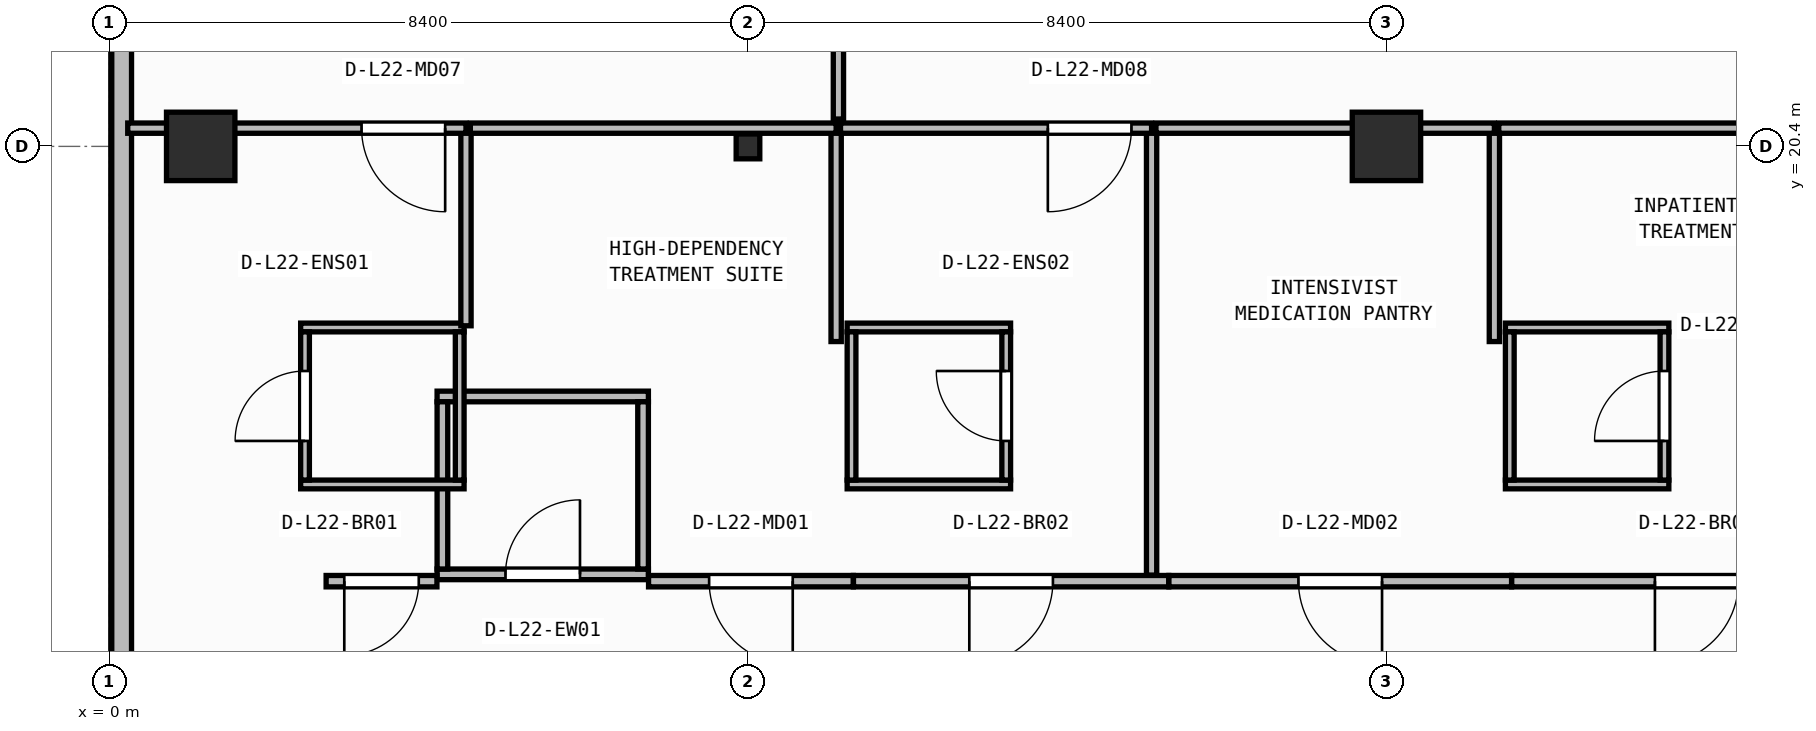
"""IFC4 building model, lengths in metres.
Left out: names, types, materials, properties, quantities, classifications, styles, units other than length and angle.
Written with IfcOpenShell. Run it as: python <this file> out.ifc"""

import sys

from ifc_helpers import new_model, si_unit, direction, frame, frame_2d, origin, origin_2d, place, context, subcontext, project, spatial, rectangle, i_section, extrude, element, fill, save


model = new_model("IFC4")
c1 = context("Model", 3, precision=1e-05, world=origin(), true_north=direction((0.0, 1.0)))
c2 = subcontext(c1, "Body", "Model", "MODEL_VIEW")
j1 = project(units=[si_unit("LENGTHUNIT", "METRE"), si_unit("PLANEANGLEUNIT", "RADIAN")], contexts=[c1])
p1 = place(None, origin())
s1 = spatial("IfcSite", under=j1, at=p1, CompositionType="ELEMENT")
p2 = place(p1, origin())
s2 = spatial("IfcBuilding", under=s1, at=p2, CompositionType="ELEMENT")
p3 = place(p2, frame((0.0, 0.0, 89.65)))
s3 = spatial("IfcBuildingStorey", under=s2, at=p3, CompositionType="ELEMENT", Elevation=89.65)
p4 = place(p3, frame((1.2, 20.4, 0.0), z_axis=(0.0, 0.0, 1.0), x_axis=(1.0, 0.0, 0.0)))
e1 = element("IfcColumn", 1, at=p4, inside=s3, PredefinedType="COLUMN", context=c2, shape_type="SweptSolid", body=[
    extrude(rectangle(XDim=0.9, YDim=0.9, at=origin_2d()), origin(), (0.0, 0.0, 1.0), 3.95),
])
p5 = place(p3, frame((8.4, 20.4, 0.0), z_axis=(0.0, 0.0, 1.0), x_axis=(1.0, 0.0, 0.0)))
e2 = element("IfcColumn", 2, at=p5, inside=s3, PredefinedType="COLUMN", context=c2, shape_type="SweptSolid", body=[
    extrude(i_section(OverallWidth=0.311, OverallDepth=0.327, WebThickness=0.016, FlangeThickness=0.025, FilletRadius=0.017, at=origin_2d()), origin(), (0.0, 0.0, 1.0), 3.95),
])
p6 = place(p3, frame((16.8, 20.4, 0.0), z_axis=(0.0, 0.0, 1.0), x_axis=(1.0, 0.0, 0.0)))
e3 = element("IfcColumn", 3, at=p6, inside=s3, PredefinedType="COLUMN", context=c2, shape_type="SweptSolid", body=[
    extrude(rectangle(XDim=0.9, YDim=0.9, at=origin_2d()), origin(), (0.0, 0.0, 1.0), 3.95),
])
p7 = place(p3, frame((0.16, 41.04, 0.0), z_axis=(0.0, 0.0, 1.0), x_axis=(0.0, -1.0, 0.0)))
e4 = element("IfcWall", 4, at=p7, inside=s3, PredefinedType="STANDARD", context=c2, shape_type="SweptSolid", body=[
    extrude(rectangle(XDim=38.28, YDim=0.26, at=frame_2d((19.14, 0.0))), origin(), (0.0, 0.0, 1.0), 3.71),
])
p8 = place(p7, frame((28.15, 0.0, 0.9)))
e5 = element("IfcOpeningElement", 5, at=p8, cuts=e4, PredefinedType="OPENING", context=c2, shape_type="SweptSolid", body=[
    extrude(rectangle(XDim=2.4, YDim=1.65, at=frame_2d((1.2, 0.825))), frame((0.0, 0.14, 0.0), z_axis=(0.0, -1.0, 0.0), x_axis=(1.0, 0.0, 0.0)), (0.0, 0.0, 1.0), 0.28),
])
p9 = place(p3, frame((4.31, 14.77, 0.0), z_axis=(0.0, 0.0, 1.0), x_axis=(1.0, 0.0, 0.0)))
e6 = element("IfcWall", 6, at=p9, inside=s3, PredefinedType="PARTITIONING", context=c2, shape_type="SweptSolid", body=[
    extrude(rectangle(XDim=2.78, YDim=0.14, at=frame_2d((1.39, 0.0))), origin(), (0.0, 0.0, 1.0), 3.71),
])
p10 = place(p9, frame((0.9, 0.0, 0.0)))
e7 = element("IfcOpeningElement", 7, at=p10, cuts=e6, PredefinedType="OPENING", context=c2, shape_type="SweptSolid", body=[
    extrude(rectangle(XDim=0.98, YDim=2.1, at=frame_2d((0.49, 1.05))), frame((0.0, 0.08, 0.0), z_axis=(0.0, -1.0, 0.0), x_axis=(1.0, 0.0, 0.0)), (0.0, 0.0, 1.0), 0.16),
])
p11 = place(p3, frame((4.31, 17.11, 0.0), z_axis=(0.0, 0.0, 1.0), x_axis=(1.0, 0.0, 0.0)))
e8 = element("IfcWall", 8, at=p11, inside=s3, PredefinedType="PARTITIONING", context=c2, shape_type="SweptSolid", body=[
    extrude(rectangle(XDim=2.78, YDim=0.14, at=frame_2d((1.39, 0.0))), origin(), (0.0, 0.0, 1.0), 3.71),
])
for number, where, z_axis, x_axis in (
    (9, (4.38, 14.84, 0.0), (0.0, 0.0, 1.0), (0.0, 1.0, 0.0)),
    (10, (7.02, 14.84, 0.0), (0.0, 0.0, 1.0), (0.0, 1.0, 0.0)),
):
    element("IfcWall", number, at=place(p3, frame(where, z_axis=z_axis, x_axis=x_axis)), inside=s3, PredefinedType="PARTITIONING", context=c2, shape_type="SweptSolid", body=[
        extrude(rectangle(XDim=2.2, YDim=0.14, at=frame_2d((1.1, 0.0))), origin(), (0.0, 0.0, 1.0), 3.71),
    ])
for number, where, z_axis, x_axis in (
    (11, (2.515, 15.952, 0.0), (0.0, 0.0, 1.0), (1.0, 0.0, 0.0)),
    (12, (2.515, 18.018, 0.0), (0.0, 0.0, 1.0), (1.0, 0.0, 0.0)),
):
    element("IfcWall", number, at=place(p3, frame(where, z_axis=z_axis, x_axis=x_axis)), inside=s3, PredefinedType="PARTITIONING", context=c2, shape_type="SweptSolid", body=[
        extrude(rectangle(XDim=2.15, YDim=0.115, at=frame_2d((1.075, 0.0))), origin(), (0.0, 0.0, 1.0), 3.71),
    ])
p12 = place(p3, frame((2.573, 16.01, 0.0), z_axis=(0.0, 0.0, 1.0), x_axis=(0.0, 1.0, 0.0)))
e13 = element("IfcWall", 13, at=p12, inside=s3, PredefinedType="PARTITIONING", context=c2, shape_type="SweptSolid", body=[
    extrude(rectangle(XDim=1.95, YDim=0.115, at=frame_2d((0.975, 0.0))), origin(), (0.0, 0.0, 1.0), 3.71),
])
p13 = place(p12, frame((0.515, 0.0, 0.0)))
e14 = element("IfcOpeningElement", 14, at=p13, cuts=e13, PredefinedType="OPENING", context=c2, shape_type="SweptSolid", body=[
    extrude(rectangle(XDim=0.92, YDim=2.1, at=frame_2d((0.46, 1.05))), frame((0.0, 0.067, 0.0), z_axis=(0.0, -1.0, 0.0), x_axis=(1.0, 0.0, 0.0)), (0.0, 0.0, 1.0), 0.135),
])
p14 = place(p3, frame((4.607, 16.01, 0.0), z_axis=(0.0, 0.0, 1.0), x_axis=(0.0, 1.0, 0.0)))
e15 = element("IfcWall", 15, at=p14, inside=s3, PredefinedType="PARTITIONING", context=c2, shape_type="SweptSolid", body=[
    extrude(rectangle(XDim=1.95, YDim=0.115, at=frame_2d((0.975, 0.0))), origin(), (0.0, 0.0, 1.0), 3.71),
])
for number, where, z_axis, x_axis in (
    (16, (9.705, 15.952, 0.0), (0.0, 0.0, 1.0), (1.0, 0.0, 0.0)),
    (17, (9.705, 18.018, 0.0), (0.0, 0.0, 1.0), (1.0, 0.0, 0.0)),
):
    element("IfcWall", number, at=place(p3, frame(where, z_axis=z_axis, x_axis=x_axis)), inside=s3, PredefinedType="PARTITIONING", context=c2, shape_type="SweptSolid", body=[
        extrude(rectangle(XDim=2.15, YDim=0.115, at=frame_2d((1.075, 0.0))), origin(), (0.0, 0.0, 1.0), 3.71),
    ])
p15 = place(p3, frame((9.762, 16.01, 0.0), z_axis=(0.0, 0.0, 1.0), x_axis=(0.0, 1.0, 0.0)))
e18 = element("IfcWall", 18, at=p15, inside=s3, PredefinedType="PARTITIONING", context=c2, shape_type="SweptSolid", body=[
    extrude(rectangle(XDim=1.95, YDim=0.115, at=frame_2d((0.975, 0.0))), origin(), (0.0, 0.0, 1.0), 3.71),
])
p16 = place(p3, frame((11.798, 16.01, 0.0), z_axis=(0.0, 0.0, 1.0), x_axis=(0.0, 1.0, 0.0)))
e19 = element("IfcWall", 19, at=p16, inside=s3, PredefinedType="PARTITIONING", context=c2, shape_type="SweptSolid", body=[
    extrude(rectangle(XDim=1.95, YDim=0.115, at=frame_2d((0.975, 0.0))), origin(), (0.0, 0.0, 1.0), 3.71),
])
p17 = place(p16, frame((0.515, 0.0, 0.0)))
e20 = element("IfcOpeningElement", 20, at=p17, cuts=e19, PredefinedType="OPENING", context=c2, shape_type="SweptSolid", body=[
    extrude(rectangle(XDim=0.92, YDim=2.1, at=frame_2d((0.46, 1.05))), frame((0.0, 0.067, 0.0), z_axis=(0.0, -1.0, 0.0), x_axis=(1.0, 0.0, 0.0)), (0.0, 0.0, 1.0), 0.135),
])
for number, where, z_axis, x_axis in (
    (21, (18.365, 15.952, 0.0), (0.0, 0.0, 1.0), (1.0, 0.0, 0.0)),
    (22, (18.365, 18.018, 0.0), (0.0, 0.0, 1.0), (1.0, 0.0, 0.0)),
):
    element("IfcWall", number, at=place(p3, frame(where, z_axis=z_axis, x_axis=x_axis)), inside=s3, PredefinedType="PARTITIONING", context=c2, shape_type="SweptSolid", body=[
        extrude(rectangle(XDim=2.15, YDim=0.115, at=frame_2d((1.075, 0.0))), origin(), (0.0, 0.0, 1.0), 3.71),
    ])
p18 = place(p3, frame((18.423, 16.01, 0.0), z_axis=(0.0, 0.0, 1.0), x_axis=(0.0, 1.0, 0.0)))
e23 = element("IfcWall", 23, at=p18, inside=s3, PredefinedType="PARTITIONING", context=c2, shape_type="SweptSolid", body=[
    extrude(rectangle(XDim=1.95, YDim=0.115, at=frame_2d((0.975, 0.0))), origin(), (0.0, 0.0, 1.0), 3.71),
])
p19 = place(p3, frame((20.458, 16.01, 0.0), z_axis=(0.0, 0.0, 1.0), x_axis=(0.0, 1.0, 0.0)))
e24 = element("IfcWall", 24, at=p19, inside=s3, PredefinedType="PARTITIONING", context=c2, shape_type="SweptSolid", body=[
    extrude(rectangle(XDim=1.95, YDim=0.115, at=frame_2d((0.975, 0.0))), origin(), (0.0, 0.0, 1.0), 3.71),
])
p20 = place(p19, frame((0.515, 0.0, 0.0)))
e25 = element("IfcOpeningElement", 25, at=p20, cuts=e24, PredefinedType="OPENING", context=c2, shape_type="SweptSolid", body=[
    extrude(rectangle(XDim=0.92, YDim=2.1, at=frame_2d((0.46, 1.05))), frame((0.0, 0.067, 0.0), z_axis=(0.0, -1.0, 0.0), x_axis=(1.0, 0.0, 0.0)), (0.0, 0.0, 1.0), 0.135),
])
p21 = place(p3, frame((4.308, 14.68, 0.0), z_axis=(0.0, 0.0, 1.0), x_axis=(-1.0, 0.0, 0.0)))
e26 = element("IfcWall", 26, at=p21, inside=s3, PredefinedType="PARTITIONING", context=c2, shape_type="SweptSolid", body=[
    extrude(rectangle(XDim=1.458, YDim=0.15, at=frame_2d((0.729, 0.0))), origin(), (0.0, 0.0, 1.0), 3.71),
])
p22 = place(p21, frame((0.239, 0.0, 0.0)))
e27 = element("IfcOpeningElement", 27, at=p22, cuts=e26, PredefinedType="OPENING", context=c2, shape_type="SweptSolid", body=[
    extrude(rectangle(XDim=0.98, YDim=2.1, at=frame_2d((0.49, 1.05))), frame((0.0, 0.085, 0.0), z_axis=(0.0, -1.0, 0.0), x_axis=(1.0, 0.0, 0.0)), (0.0, 0.0, 1.0), 0.17),
])
p23 = place(p3, frame((9.786, 14.68, 0.0), z_axis=(0.0, 0.0, 1.0), x_axis=(-1.0, 0.0, 0.0)))
e28 = element("IfcWall", 28, at=p23, inside=s3, PredefinedType="PARTITIONING", context=c2, shape_type="SweptSolid", body=[
    extrude(rectangle(XDim=2.694, YDim=0.15, at=frame_2d((1.347, 0.0))), origin(), (0.0, 0.0, 1.0), 3.71),
])
p24 = place(p23, frame((0.797, 0.0, 0.0)))
e29 = element("IfcOpeningElement", 29, at=p24, cuts=e28, PredefinedType="OPENING", context=c2, shape_type="SweptSolid", body=[
    extrude(rectangle(XDim=1.1, YDim=2.1, at=frame_2d((0.55, 1.05))), frame((0.0, 0.085, 0.0), z_axis=(0.0, -1.0, 0.0), x_axis=(1.0, 0.0, 0.0)), (0.0, 0.0, 1.0), 0.17),
])
p25 = place(p3, frame((13.936, 14.68, 0.0), z_axis=(0.0, 0.0, 1.0), x_axis=(-1.0, 0.0, 0.0)))
e30 = element("IfcWall", 30, at=p25, inside=s3, PredefinedType="PARTITIONING", context=c2, shape_type="SweptSolid", body=[
    extrude(rectangle(XDim=4.148, YDim=0.15, at=frame_2d((2.074, 0.0))), origin(), (0.0, 0.0, 1.0), 3.71),
])
p26 = place(p25, frame((1.524, 0.0, 0.0)))
e31 = element("IfcOpeningElement", 31, at=p26, cuts=e30, PredefinedType="OPENING", context=c2, shape_type="SweptSolid", body=[
    extrude(rectangle(XDim=1.1, YDim=2.1, at=frame_2d((0.55, 1.05))), frame((0.0, 0.085, 0.0), z_axis=(0.0, -1.0, 0.0), x_axis=(1.0, 0.0, 0.0)), (0.0, 0.0, 1.0), 0.17),
])
p27 = place(p3, frame((18.446, 14.68, 0.0), z_axis=(0.0, 0.0, 1.0), x_axis=(-1.0, 0.0, 0.0)))
e32 = element("IfcWall", 32, at=p27, inside=s3, PredefinedType="PARTITIONING", context=c2, shape_type="SweptSolid", body=[
    extrude(rectangle(XDim=4.508, YDim=0.15, at=frame_2d((2.254, 0.0))), origin(), (0.0, 0.0, 1.0), 3.71),
])
p28 = place(p27, frame((1.704, 0.0, 0.0)))
e33 = element("IfcOpeningElement", 33, at=p28, cuts=e32, PredefinedType="OPENING", context=c2, shape_type="SweptSolid", body=[
    extrude(rectangle(XDim=1.1, YDim=2.1, at=frame_2d((0.55, 1.05))), frame((0.0, 0.085, 0.0), z_axis=(0.0, -1.0, 0.0), x_axis=(1.0, 0.0, 0.0)), (0.0, 0.0, 1.0), 0.17),
])
p29 = place(p3, frame((23.316, 14.68, 0.0), z_axis=(0.0, 0.0, 1.0), x_axis=(-1.0, 0.0, 0.0)))
e34 = element("IfcWall", 34, at=p29, inside=s3, PredefinedType="PARTITIONING", context=c2, shape_type="SweptSolid", body=[
    extrude(rectangle(XDim=4.868, YDim=0.15, at=frame_2d((2.434, 0.0))), origin(), (0.0, 0.0, 1.0), 3.71),
])
p30 = place(p29, frame((1.884, 0.0, 0.0)))
e35 = element("IfcOpeningElement", 35, at=p30, cuts=e34, PredefinedType="OPENING", context=c2, shape_type="SweptSolid", body=[
    extrude(rectangle(XDim=1.1, YDim=2.1, at=frame_2d((0.55, 1.05))), frame((0.0, 0.085, 0.0), z_axis=(0.0, -1.0, 0.0), x_axis=(1.0, 0.0, 0.0)), (0.0, 0.0, 1.0), 0.17),
])
p31 = place(p3, frame((4.69, 18.04, 0.0), z_axis=(0.0, 0.0, 1.0), x_axis=(0.0, 1.0, 0.0)))
e36 = element("IfcWall", 36, at=p31, inside=s3, PredefinedType="PARTITIONING", context=c2, shape_type="SweptSolid", body=[
    extrude(rectangle(XDim=2.6, YDim=0.135, at=frame_2d((1.3, 0.0))), origin(), (0.0, 0.0, 1.0), 3.71),
])
p32 = place(p3, frame((4.69, 20.64, 0.0), z_axis=(0.0, 0.0, 1.0), x_axis=(-1.0, 0.0, 0.0)))
e37 = element("IfcWall", 37, at=p32, inside=s3, PredefinedType="PARTITIONING", context=c2, shape_type="SweptSolid", body=[
    extrude(rectangle(XDim=4.45, YDim=0.135, at=frame_2d((2.225, 0.0))), origin(), (0.0, 0.0, 1.0), 3.073),
])
p33 = place(p32, frame((0.274, 0.0, 0.0)))
e38 = element("IfcOpeningElement", 38, at=p33, cuts=e37, PredefinedType="OPENING", context=c2, shape_type="SweptSolid", body=[
    extrude(rectangle(XDim=1.1, YDim=2.1, at=frame_2d((0.55, 1.05))), frame((0.0, 0.077, 0.0), z_axis=(0.0, -1.0, 0.0), x_axis=(1.0, 0.0, 0.0)), (0.0, 0.0, 1.0), 0.155),
])
p34 = place(p3, frame((9.56, 17.833, 0.0), z_axis=(0.0, 0.0, 1.0), x_axis=(0.0, 1.0, 0.0)))
e39 = element("IfcWall", 39, at=p34, inside=s3, PredefinedType="PARTITIONING", context=c2, shape_type="SweptSolid", body=[
    extrude(rectangle(XDim=2.807, YDim=0.135, at=frame_2d((1.404, 0.0))), origin(), (0.0, 0.0, 1.0), 3.71),
])
p35 = place(p3, frame((9.56, 20.64, 0.0), z_axis=(0.0, 0.0, 1.0), x_axis=(-1.0, 0.0, 0.0)))
e40 = element("IfcWall", 40, at=p35, inside=s3, PredefinedType="PARTITIONING", context=c2, shape_type="SweptSolid", body=[
    extrude(rectangle(XDim=4.812, YDim=0.135, at=frame_2d((2.406, 0.0))), origin(), (0.0, 0.0, 1.0), 3.073),
])
p36 = place(p3, frame((13.71, 14.76, 0.0), z_axis=(0.0, 0.0, 1.0), x_axis=(0.0, 1.0, 0.0)))
e41 = element("IfcWall", 41, at=p36, inside=s3, PredefinedType="PARTITIONING", context=c2, shape_type="SweptSolid", body=[
    extrude(rectangle(XDim=5.88, YDim=0.135, at=frame_2d((2.94, 0.0))), origin(), (0.0, 0.0, 1.0), 3.71),
])
p37 = place(p3, frame((13.71, 20.64, 0.0), z_axis=(0.0, 0.0, 1.0), x_axis=(-1.0, 0.0, 0.0)))
e42 = element("IfcWall", 42, at=p37, inside=s3, PredefinedType="PARTITIONING", context=c2, shape_type="SweptSolid", body=[
    extrude(rectangle(XDim=4.093, YDim=0.135, at=frame_2d((2.046, 0.0))), origin(), (0.0, 0.0, 1.0), 3.073),
])
p38 = place(p37, frame((0.265, 0.0, 0.0)))
e43 = element("IfcOpeningElement", 43, at=p38, cuts=e42, PredefinedType="OPENING", context=c2, shape_type="SweptSolid", body=[
    extrude(rectangle(XDim=1.1, YDim=2.1, at=frame_2d((0.55, 1.05))), frame((0.0, 0.077, 0.0), z_axis=(0.0, -1.0, 0.0), x_axis=(1.0, 0.0, 0.0)), (0.0, 0.0, 1.0), 0.155),
])
p39 = place(p3, frame((18.22, 17.833, 0.0), z_axis=(0.0, 0.0, 1.0), x_axis=(0.0, 1.0, 0.0)))
e44 = element("IfcWall", 44, at=p39, inside=s3, PredefinedType="PARTITIONING", context=c2, shape_type="SweptSolid", body=[
    extrude(rectangle(XDim=2.807, YDim=0.135, at=frame_2d((1.404, 0.0))), origin(), (0.0, 0.0, 1.0), 3.71),
])
p40 = place(p3, frame((18.22, 20.64, 0.0), z_axis=(0.0, 0.0, 1.0), x_axis=(-1.0, 0.0, 0.0)))
e45 = element("IfcWall", 45, at=p40, inside=s3, PredefinedType="PARTITIONING", context=c2, shape_type="SweptSolid", body=[
    extrude(rectangle(XDim=4.452, YDim=0.135, at=frame_2d((2.226, 0.0))), origin(), (0.0, 0.0, 1.0), 3.073),
])
p41 = place(p3, frame((23.032, 20.64, 0.0), z_axis=(0.0, 0.0, 1.0), x_axis=(-1.0, 0.0, 0.0)))
e46 = element("IfcWall", 46, at=p41, inside=s3, PredefinedType="PARTITIONING", context=c2, shape_type="SweptSolid", body=[
    extrude(rectangle(XDim=4.755, YDim=0.135, at=frame_2d((2.377, 0.0))), origin(), (0.0, 0.0, 1.0), 3.073),
])
p42 = place(p3, frame((9.59, 20.76, 0.0), z_axis=(0.0, 0.0, 1.0), x_axis=(0.0, 1.0, 0.0)))
e47 = element("IfcWall", 47, at=p42, inside=s3, PredefinedType="PARTITIONING", context=c2, shape_type="SweptSolid", body=[
    extrude(rectangle(XDim=6.38, YDim=0.135, at=frame_2d((3.19, 0.0))), origin(), (0.0, 0.0, 1.0), 3.71),
])
p43 = place(p10, origin())
e48 = element("IfcDoor", 48, at=p43, inside=s3, OperationType="SINGLE_SWING_RIGHT", PredefinedType="DOOR", context=c2, shape_type="SweptSolid", body=[
    extrude(rectangle(XDim=0.98, YDim=2.1, at=frame_2d((0.49, 1.05))), frame((0.0, 0.025, 0.0), z_axis=(0.0, -1.0, 0.0), x_axis=(1.0, 0.0, 0.0)), (0.0, 0.0, 1.0), 0.05),
])
fill(e7, e48)
p44 = place(p13, origin())
e49 = element("IfcDoor", 49, at=p44, inside=s3, OperationType="SINGLE_SWING_LEFT", PredefinedType="DOOR", context=c2, shape_type="SweptSolid", body=[
    extrude(rectangle(XDim=0.92, YDim=2.1, at=frame_2d((0.46, 1.05))), frame((0.0, 0.025, 0.0), z_axis=(0.0, -1.0, 0.0), x_axis=(1.0, 0.0, 0.0)), (0.0, 0.0, 1.0), 0.05),
])
fill(e14, e49)
p45 = place(p17, origin())
e50 = element("IfcDoor", 50, at=p45, inside=s3, OperationType="SINGLE_SWING_RIGHT", PredefinedType="DOOR", context=c2, shape_type="SweptSolid", body=[
    extrude(rectangle(XDim=0.92, YDim=2.1, at=frame_2d((0.46, 1.05))), frame((0.0, 0.025, 0.0), z_axis=(0.0, -1.0, 0.0), x_axis=(1.0, 0.0, 0.0)), (0.0, 0.0, 1.0), 0.05),
])
fill(e20, e50)
p46 = place(p20, origin())
e51 = element("IfcDoor", 51, at=p46, inside=s3, OperationType="SINGLE_SWING_LEFT", PredefinedType="DOOR", context=c2, shape_type="SweptSolid", body=[
    extrude(rectangle(XDim=0.92, YDim=2.1, at=frame_2d((0.46, 1.05))), frame((0.0, 0.025, 0.0), z_axis=(0.0, -1.0, 0.0), x_axis=(1.0, 0.0, 0.0)), (0.0, 0.0, 1.0), 0.05),
])
fill(e25, e51)
p47 = place(p22, origin())
e52 = element("IfcDoor", 52, at=p47, inside=s3, OperationType="SINGLE_SWING_RIGHT", PredefinedType="DOOR", context=c2, shape_type="SweptSolid", body=[
    extrude(rectangle(XDim=0.98, YDim=2.1, at=frame_2d((0.49, 1.05))), frame((0.0, 0.025, 0.0), z_axis=(0.0, -1.0, 0.0), x_axis=(1.0, 0.0, 0.0)), (0.0, 0.0, 1.0), 0.05),
])
fill(e27, e52)
p48 = place(p24, origin())
e53 = element("IfcDoor", 53, at=p48, inside=s3, OperationType="SINGLE_SWING_LEFT", PredefinedType="DOOR", context=c2, shape_type="SweptSolid", body=[
    extrude(rectangle(XDim=1.1, YDim=2.1, at=frame_2d((0.55, 1.05))), frame((0.0, 0.025, 0.0), z_axis=(0.0, -1.0, 0.0), x_axis=(1.0, 0.0, 0.0)), (0.0, 0.0, 1.0), 0.05),
])
fill(e29, e53)
p49 = place(p26, origin())
e54 = element("IfcDoor", 54, at=p49, inside=s3, OperationType="SINGLE_SWING_RIGHT", PredefinedType="DOOR", context=c2, shape_type="SweptSolid", body=[
    extrude(rectangle(XDim=1.1, YDim=2.1, at=frame_2d((0.55, 1.05))), frame((0.0, 0.025, 0.0), z_axis=(0.0, -1.0, 0.0), x_axis=(1.0, 0.0, 0.0)), (0.0, 0.0, 1.0), 0.05),
])
fill(e31, e54)
p50 = place(p28, origin())
e55 = element("IfcDoor", 55, at=p50, inside=s3, OperationType="SINGLE_SWING_LEFT", PredefinedType="DOOR", context=c2, shape_type="SweptSolid", body=[
    extrude(rectangle(XDim=1.1, YDim=2.1, at=frame_2d((0.55, 1.05))), frame((0.0, 0.025, 0.0), z_axis=(0.0, -1.0, 0.0), x_axis=(1.0, 0.0, 0.0)), (0.0, 0.0, 1.0), 0.05),
])
fill(e33, e55)
p51 = place(p30, origin())
e56 = element("IfcDoor", 56, at=p51, inside=s3, OperationType="SINGLE_SWING_RIGHT", PredefinedType="DOOR", context=c2, shape_type="SweptSolid", body=[
    extrude(rectangle(XDim=1.1, YDim=2.1, at=frame_2d((0.55, 1.05))), frame((0.0, 0.025, 0.0), z_axis=(0.0, -1.0, 0.0), x_axis=(1.0, 0.0, 0.0)), (0.0, 0.0, 1.0), 0.05),
])
fill(e35, e56)
p52 = place(p33, origin())
e57 = element("IfcDoor", 57, at=p52, inside=s3, OperationType="SINGLE_SWING_LEFT", PredefinedType="DOOR", context=c2, shape_type="SweptSolid", body=[
    extrude(rectangle(XDim=1.1, YDim=2.1, at=frame_2d((0.55, 1.05))), frame((0.0, 0.025, 0.0), z_axis=(0.0, -1.0, 0.0), x_axis=(1.0, 0.0, 0.0)), (0.0, 0.0, 1.0), 0.05),
])
fill(e38, e57)
p53 = place(p38, origin())
e58 = element("IfcDoor", 58, at=p53, inside=s3, OperationType="SINGLE_SWING_RIGHT", PredefinedType="DOOR", context=c2, shape_type="SweptSolid", body=[
    extrude(rectangle(XDim=1.1, YDim=2.1, at=frame_2d((0.55, 1.05))), frame((0.0, 0.025, 0.0), z_axis=(0.0, -1.0, 0.0), x_axis=(1.0, 0.0, 0.0)), (0.0, 0.0, 1.0), 0.05),
])
fill(e43, e58)
save(model, sys.argv[1])
